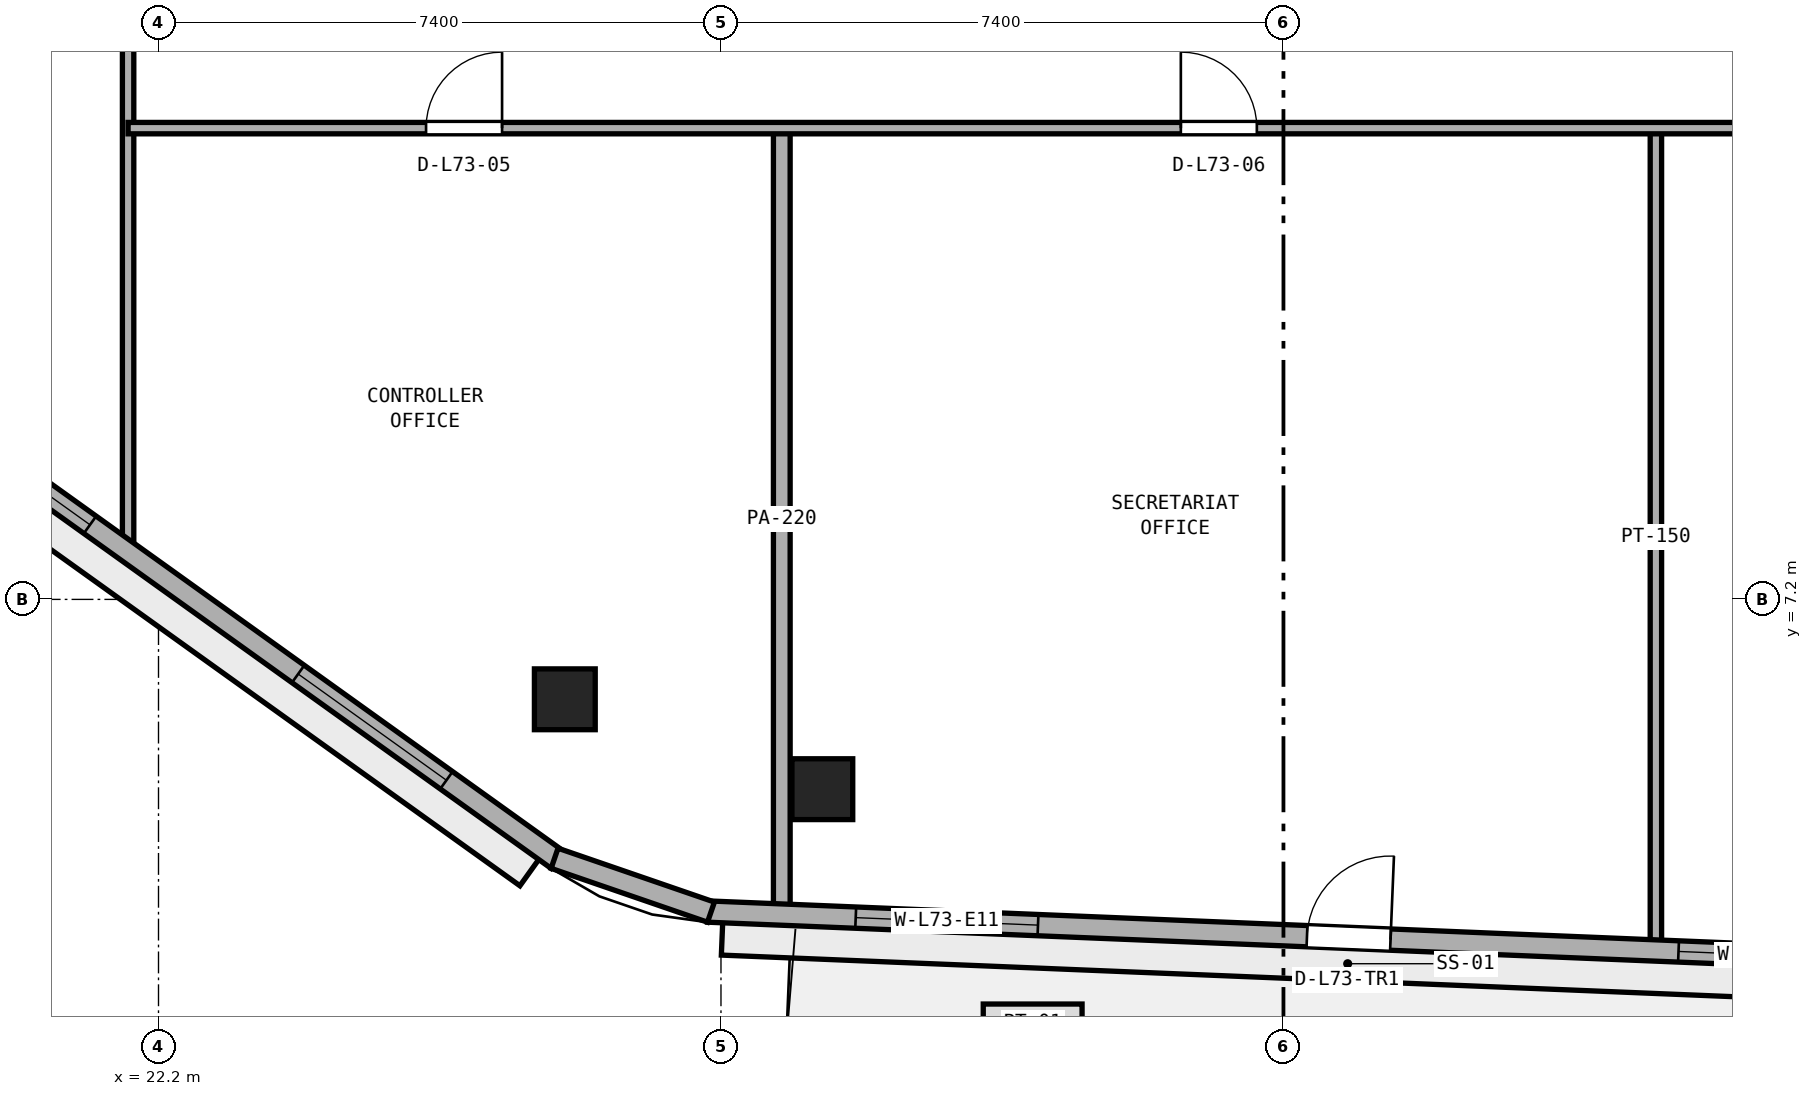
"""IFC4 building model, lengths in metres.
Left out: names, types, materials, properties, quantities, classifications, styles, units other than length and angle.
Written with IfcOpenShell. Run it as: python <this file> out.ifc"""

import sys

from ifc_helpers import new_model, si_unit, direction, frame, frame_2d, origin, origin_2d, place, context, subcontext, project, spatial, rectangle, extrude, element, fill, save


model = new_model("IFC4")
c1 = context("Model", 3, precision=1e-05, world=origin(), true_north=direction((0.0, 1.0)))
c2 = subcontext(c1, "Body", "Model", "MODEL_VIEW")
j1 = project(units=[si_unit("LENGTHUNIT", "METRE"), si_unit("PLANEANGLEUNIT", "RADIAN")], contexts=[c1])
p1 = place(None, origin())
s1 = spatial("IfcSite", under=j1, at=p1, CompositionType="ELEMENT")
p2 = place(p1, origin())
s2 = spatial("IfcBuilding", under=s1, at=p2, CompositionType="ELEMENT")
p3 = place(p2, frame((0.0, 0.0, 285.8)))
s3 = spatial("IfcBuildingStorey", under=s2, at=p3, CompositionType="ELEMENT", Elevation=285.8)
for number, where, z_axis, x_axis in (
    (1, (30.934, 4.703, 0.0), (0.0, 0.0, 1.0), (1.0, 0.0, 0.0)),
    (2, (27.545, 5.886, 0.0), (0.0, 0.0, 1.0), (1.0, 0.0, 0.0)),
):
    element("IfcColumn", number, at=place(p3, frame(where, z_axis=z_axis, x_axis=x_axis)), inside=s3, PredefinedType="COLUMN", context=c2, shape_type="SweptSolid", body=[
        extrude(rectangle(XDim=0.8, YDim=0.8, at=origin_2d()), origin(), (0.0, 0.0, 1.0), 3.8),
    ])
p4 = place(p3, frame((41.9, 2.646, 0.0), z_axis=(0.0, 0.0, 1.0), x_axis=(0.0, 1.0, 0.0)))
e3 = element("IfcWall", 3, at=p4, inside=s3, PredefinedType="PARTITIONING", context=c2, shape_type="SweptSolid", body=[
    extrude(rectangle(XDim=10.754, YDim=0.15, at=frame_2d((5.377, 0.0))), origin(), (0.0, 0.0, 1.0), 3.54),
])
p5 = place(p3, frame((30.4, 3.118, 0.0), z_axis=(0.0, 0.0, 1.0), x_axis=(0.0, 1.0, 0.0)))
e4 = element("IfcWall", 4, at=p5, inside=s3, PredefinedType="PARTITIONING", context=c2, shape_type="SweptSolid", body=[
    extrude(rectangle(XDim=10.282, YDim=0.22, at=frame_2d((5.141, 0.0))), origin(), (0.0, 0.0, 1.0), 3.54),
])
p6 = place(p3, frame((21.8, 7.79, 0.0), z_axis=(0.0, 0.0, 1.0), x_axis=(0.0, 1.0, 0.0)))
e5 = element("IfcWall", 5, at=p6, inside=s3, PredefinedType="PARTITIONING", context=c2, shape_type="SweptSolid", body=[
    extrude(rectangle(XDim=29.21, YDim=0.15, at=frame_2d((14.605, 0.0))), origin(), (0.0, 0.0, 1.0), 3.54),
])
p7 = place(p6, frame((9.76, 0.0, 0.0)))
e6 = element("IfcOpeningElement", 6, at=p7, cuts=e5, PredefinedType="OPENING", context=c2, shape_type="SweptSolid", body=[
    extrude(rectangle(XDim=0.9, YDim=2.1, at=frame_2d((0.45, 1.05))), frame((0.0, 0.085, 0.0), z_axis=(0.0, -1.0, 0.0), x_axis=(1.0, 0.0, 0.0)), (0.0, 0.0, 1.0), 0.17),
])
p8 = place(p6, frame((18.11, 0.0, 0.0)))
e7 = element("IfcOpeningElement", 7, at=p8, cuts=e5, PredefinedType="OPENING", context=c2, shape_type="SweptSolid", body=[
    extrude(rectangle(XDim=0.9, YDim=2.1, at=frame_2d((0.45, 1.05))), frame((0.0, 0.085, 0.0), z_axis=(0.0, -1.0, 0.0), x_axis=(1.0, 0.0, 0.0)), (0.0, 0.0, 1.0), 0.17),
])
p9 = place(p6, frame((23.485, 0.0, 0.0)))
e8 = element("IfcOpeningElement", 8, at=p9, cuts=e5, PredefinedType="OPENING", context=c2, shape_type="SweptSolid", body=[
    extrude(rectangle(XDim=0.9, YDim=2.1, at=frame_2d((0.45, 1.05))), frame((0.0, 0.085, 0.0), z_axis=(0.0, -1.0, 0.0), x_axis=(1.0, 0.0, 0.0)), (0.0, 0.0, 1.0), 0.17),
])
p10 = place(p3, frame((21.8, 13.4, 0.0), z_axis=(0.0, 0.0, 1.0), x_axis=(1.0, 0.0, 0.0)))
e9 = element("IfcWall", 9, at=p10, inside=s3, PredefinedType="PARTITIONING", context=c2, shape_type="SweptSolid", body=[
    extrude(rectangle(XDim=26.8, YDim=0.15, at=frame_2d((13.4, 0.0))), origin(), (0.0, 0.0, 1.0), 3.54),
])
p11 = place(p10, frame((3.92, 0.0, 0.0)))
e10 = element("IfcOpeningElement", 10, at=p11, cuts=e9, PredefinedType="OPENING", context=c2, shape_type="SweptSolid", body=[
    extrude(rectangle(XDim=1.0, YDim=2.12, at=frame_2d((0.5, 1.06))), frame((0.0, 0.085, 0.0), z_axis=(0.0, -1.0, 0.0), x_axis=(1.0, 0.0, 0.0)), (0.0, 0.0, 1.0), 0.17),
])
p12 = place(p10, frame((13.85, 0.0, 0.0)))
e11 = element("IfcOpeningElement", 11, at=p12, cuts=e9, PredefinedType="OPENING", context=c2, shape_type="SweptSolid", body=[
    extrude(rectangle(XDim=1.0, YDim=2.12, at=frame_2d((0.5, 1.06))), frame((0.0, 0.085, 0.0), z_axis=(0.0, -1.0, 0.0), x_axis=(1.0, 0.0, 0.0)), (0.0, 0.0, 1.0), 0.17),
])
p13 = place(p10, frame((22.88, 0.0, 0.0)))
e12 = element("IfcOpeningElement", 12, at=p13, cuts=e9, PredefinedType="OPENING", context=c2, shape_type="SweptSolid", body=[
    extrude(rectangle(XDim=0.9, YDim=2.1, at=frame_2d((0.45, 1.05))), frame((0.0, 0.085, 0.0), z_axis=(0.0, -1.0, 0.0), x_axis=(1.0, 0.0, 0.0)), (0.0, 0.0, 1.0), 0.17),
])
p14 = place(p3, frame((29.428, 3.093, 0.0), z_axis=(0.0, 0.0, 1.0), x_axis=(0.999156257967, -0.041070331944, 0.0)))
e13 = element("IfcWall", 13, at=p14, inside=s3, PredefinedType="STANDARD", context=c2, shape_type="SweptSolid", body=[
    extrude(rectangle(XDim=16.876, YDim=0.28, at=frame_2d((8.438, 0.0))), origin(), (0.0, 0.0, 1.0), 3.54),
])
p15 = place(p14, frame((7.888, 0.0, 0.0)))
e14 = element("IfcOpeningElement", 14, at=p15, cuts=e13, PredefinedType="OPENING", context=c2, shape_type="SweptSolid", body=[
    extrude(rectangle(XDim=1.1, YDim=2.2, at=frame_2d((0.55, 1.1))), frame((0.0, 0.15, 0.0), z_axis=(0.0, -1.0, 0.0), x_axis=(1.0, 0.0, 0.0)), (0.0, 0.0, 1.0), 0.3),
])
p16 = place(p14, frame((1.946, 0.0, 0.9)))
e15 = element("IfcOpeningElement", 15, at=p16, cuts=e13, PredefinedType="OPENING", context=c2, shape_type="SweptSolid", body=[
    extrude(rectangle(XDim=2.4, YDim=1.75, at=frame_2d((1.2, 0.875))), frame((0.0, 0.15, 0.0), z_axis=(0.0, -1.0, 0.0), x_axis=(1.0, 0.0, 0.0)), (0.0, 0.0, 1.0), 0.3),
])
p17 = place(p14, frame((12.78, 0.0, 0.9)))
e16 = element("IfcOpeningElement", 16, at=p17, cuts=e13, PredefinedType="OPENING", context=c2, shape_type="SweptSolid", body=[
    extrude(rectangle(XDim=2.4, YDim=1.75, at=frame_2d((1.2, 0.875))), frame((0.0, 0.15, 0.0), z_axis=(0.0, -1.0, 0.0), x_axis=(1.0, 0.0, 0.0)), (0.0, 0.0, 1.0), 0.3),
])
p18 = place(p3, frame((14.468, 13.077, 0.0), z_axis=(0.0, 0.0, 1.0), x_axis=(0.812809888039, -0.582529042972, 0.0)))
e17 = element("IfcWall", 17, at=p18, inside=s3, PredefinedType="STANDARD", context=c2, shape_type="SweptSolid", body=[
    extrude(rectangle(XDim=15.968, YDim=0.28, at=frame_2d((7.984, 0.0))), origin(), (0.0, 0.0, 1.0), 3.54),
])
p19 = place(p18, frame((1.795, 0.0, 0.9)))
e18 = element("IfcOpeningElement", 18, at=p19, cuts=e17, PredefinedType="OPENING", context=c2, shape_type="SweptSolid", body=[
    extrude(rectangle(XDim=2.4, YDim=1.75, at=frame_2d((1.2, 0.875))), frame((0.0, 0.15, 0.0), z_axis=(0.0, -1.0, 0.0), x_axis=(1.0, 0.0, 0.0)), (0.0, 0.0, 1.0), 0.3),
])
p20 = place(p18, frame((6.004, 0.0, 0.9)))
e19 = element("IfcOpeningElement", 19, at=p20, cuts=e17, PredefinedType="OPENING", context=c2, shape_type="SweptSolid", body=[
    extrude(rectangle(XDim=2.4, YDim=1.75, at=frame_2d((1.2, 0.875))), frame((0.0, 0.15, 0.0), z_axis=(0.0, -1.0, 0.0), x_axis=(1.0, 0.0, 0.0)), (0.0, 0.0, 1.0), 0.3),
])
p21 = place(p18, frame((11.773, 0.0, 0.9)))
e20 = element("IfcOpeningElement", 20, at=p21, cuts=e17, PredefinedType="OPENING", context=c2, shape_type="SweptSolid", body=[
    extrude(rectangle(XDim=2.4, YDim=1.75, at=frame_2d((1.2, 0.875))), frame((0.0, 0.15, 0.0), z_axis=(0.0, -1.0, 0.0), x_axis=(1.0, 0.0, 0.0)), (0.0, 0.0, 1.0), 0.3),
])
p22 = place(p3, frame((27.411, 3.794, 0.0), z_axis=(0.0, 0.0, 1.0), x_axis=(0.945552869008, -0.325468542121, 0.0)))
e21 = element("IfcWall", 21, at=p22, inside=s3, PredefinedType="STANDARD", context=c2, shape_type="SweptSolid", body=[
    extrude(rectangle(XDim=2.176, YDim=0.28, at=frame_2d((1.088, 0.0))), origin(), (0.0, 0.0, 1.0), 3.54),
])
p23 = place(p11, origin())
e22 = element("IfcDoor", 22, at=p23, inside=s3, OperationType="SINGLE_SWING_RIGHT", PredefinedType="DOOR", context=c2, shape_type="SweptSolid", body=[
    extrude(rectangle(XDim=1.0, YDim=2.12, at=frame_2d((0.5, 1.06))), frame((0.0, 0.025, 0.0), z_axis=(0.0, -1.0, 0.0), x_axis=(1.0, 0.0, 0.0)), (0.0, 0.0, 1.0), 0.05),
])
fill(e10, e22)
p24 = place(p12, origin())
e23 = element("IfcDoor", 23, at=p24, inside=s3, OperationType="SINGLE_SWING_LEFT", PredefinedType="DOOR", context=c2, shape_type="SweptSolid", body=[
    extrude(rectangle(XDim=1.0, YDim=2.12, at=frame_2d((0.5, 1.06))), frame((0.0, 0.025, 0.0), z_axis=(0.0, -1.0, 0.0), x_axis=(1.0, 0.0, 0.0)), (0.0, 0.0, 1.0), 0.05),
])
fill(e11, e23)
p25 = place(p15, origin())
e24 = element("IfcDoor", 24, at=p25, inside=s3, OperationType="SINGLE_SWING_RIGHT", PredefinedType="DOOR", context=c2, shape_type="SweptSolid", body=[
    extrude(rectangle(XDim=1.1, YDim=2.2, at=frame_2d((0.55, 1.1))), frame((0.0, 0.025, 0.0), z_axis=(0.0, -1.0, 0.0), x_axis=(1.0, 0.0, 0.0)), (0.0, 0.0, 1.0), 0.05),
])
fill(e14, e24)
p26 = place(p16, origin())
e25 = element("IfcWindow", 25, at=p26, inside=s3, PartitioningType="SINGLE_PANEL", PredefinedType="WINDOW", context=c2, shape_type="SweptSolid", body=[
    extrude(rectangle(XDim=2.4, YDim=1.75, at=frame_2d((1.2, 0.875))), frame((0.0, 0.03, 0.0), z_axis=(0.0, -1.0, 0.0), x_axis=(1.0, 0.0, 0.0)), (0.0, 0.0, 1.0), 0.06),
])
fill(e15, e25)
p27 = place(p17, origin())
e26 = element("IfcWindow", 26, at=p27, inside=s3, PartitioningType="SINGLE_PANEL", PredefinedType="WINDOW", context=c2, shape_type="SweptSolid", body=[
    extrude(rectangle(XDim=2.4, YDim=1.75, at=frame_2d((1.2, 0.875))), frame((0.0, 0.03, 0.0), z_axis=(0.0, -1.0, 0.0), x_axis=(1.0, 0.0, 0.0)), (0.0, 0.0, 1.0), 0.06),
])
fill(e16, e26)
p28 = place(p20, origin())
e27 = element("IfcWindow", 27, at=p28, inside=s3, PartitioningType="SINGLE_PANEL", PredefinedType="WINDOW", context=c2, shape_type="SweptSolid", body=[
    extrude(rectangle(XDim=2.4, YDim=1.75, at=frame_2d((1.2, 0.875))), frame((0.0, 0.03, 0.0), z_axis=(0.0, -1.0, 0.0), x_axis=(1.0, 0.0, 0.0)), (0.0, 0.0, 1.0), 0.06),
])
fill(e19, e27)
p29 = place(p21, origin())
e28 = element("IfcWindow", 28, at=p29, inside=s3, PartitioningType="SINGLE_PANEL", PredefinedType="WINDOW", context=c2, shape_type="SweptSolid", body=[
    extrude(rectangle(XDim=2.4, YDim=1.75, at=frame_2d((1.2, 0.875))), frame((0.0, 0.03, 0.0), z_axis=(0.0, -1.0, 0.0), x_axis=(1.0, 0.0, 0.0)), (0.0, 0.0, 1.0), 0.06),
])
fill(e20, e28)
save(model, sys.argv[1])
